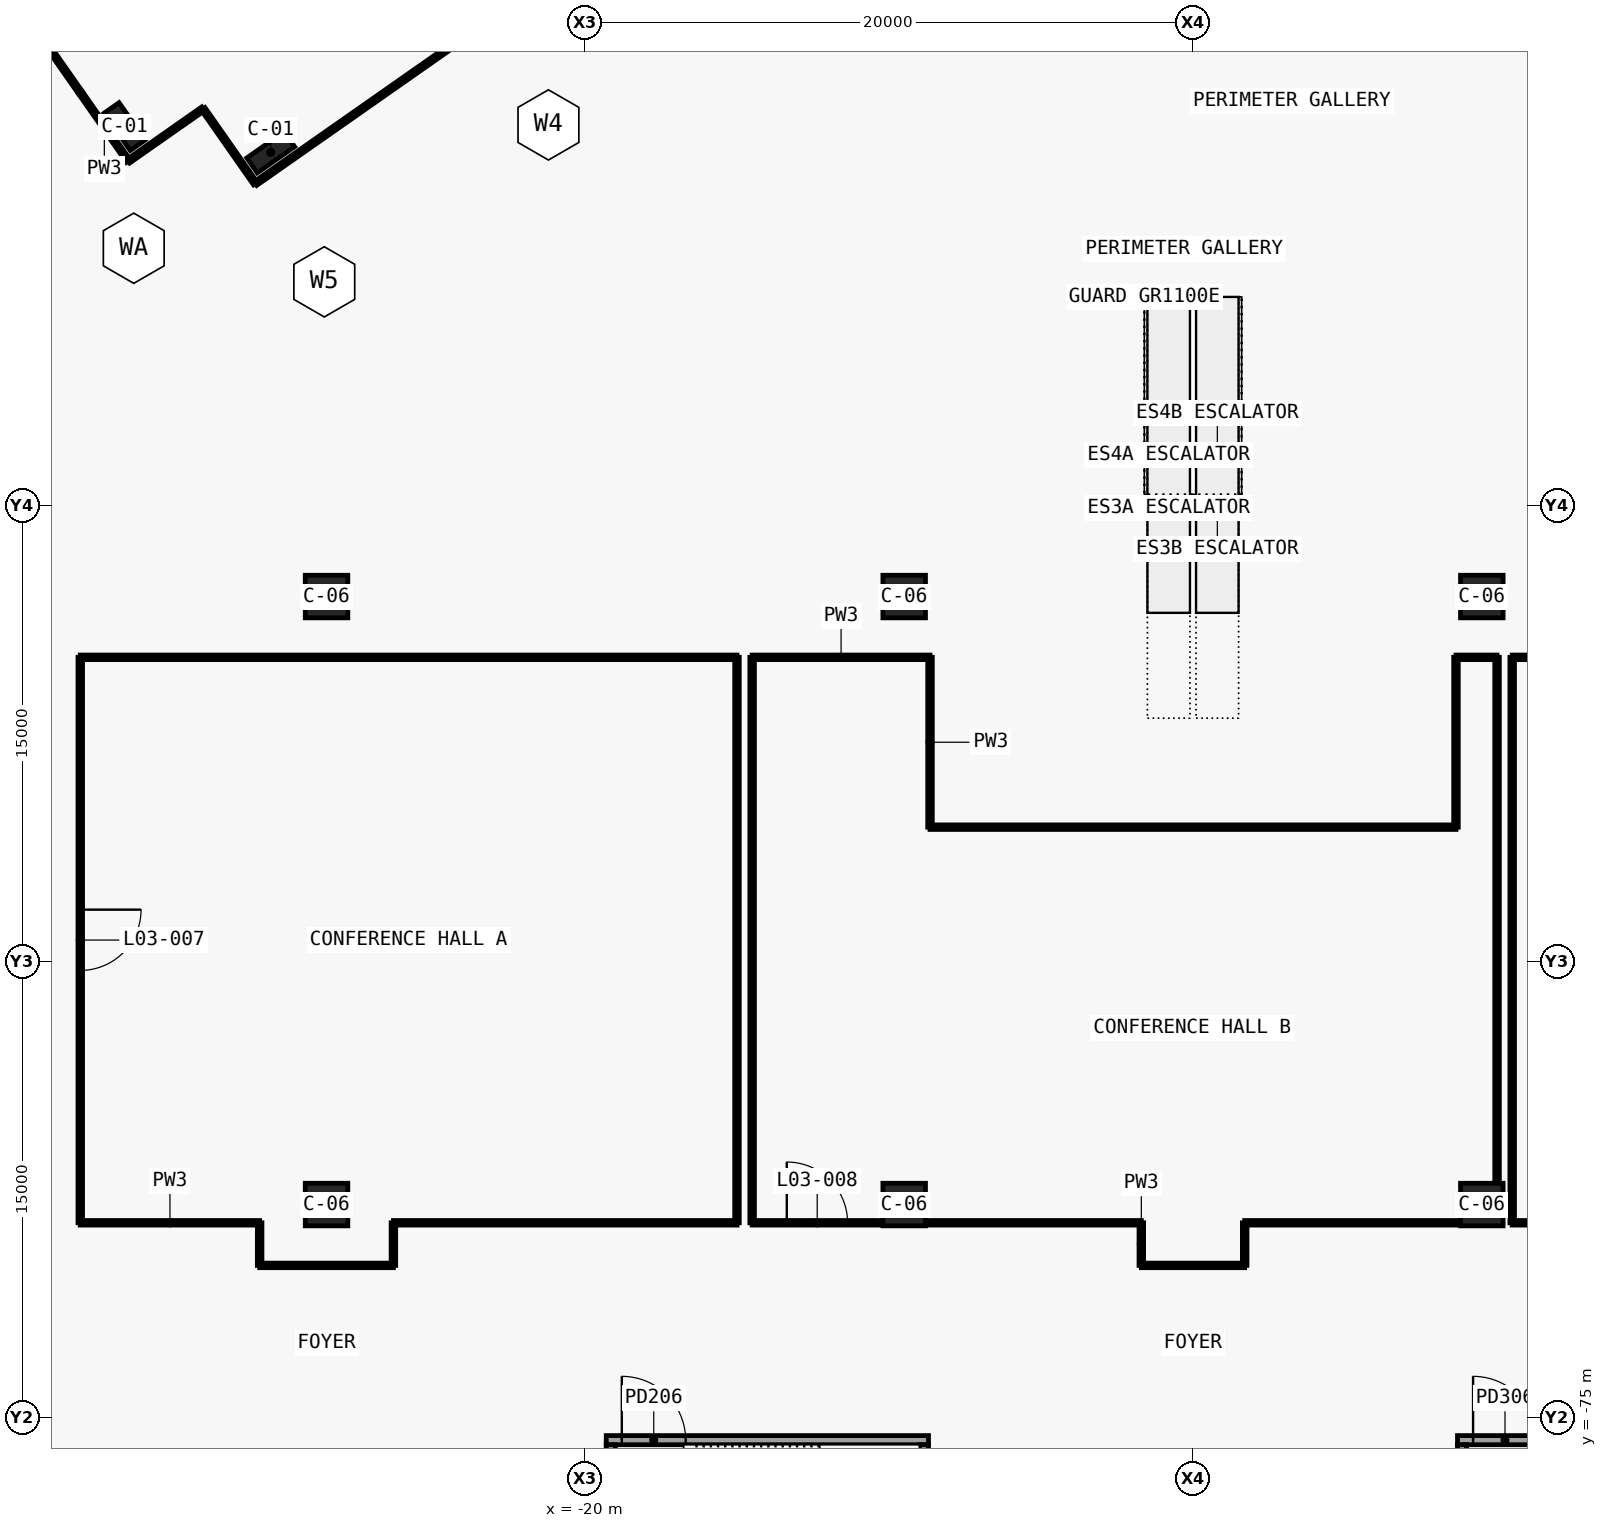
"""IFC4 building model, lengths in metres.
Left out: names, types, materials, properties, quantities, classifications, styles, units other than length and angle.
Written with IfcOpenShell. Run it as: python <this file> out.ifc"""

import sys

from ifc_helpers import new_model, si_unit, direction, frame, frame_2d, origin, origin_2d, place, context, subcontext, project, spatial, rectangle, extrude, element, fill, save


model = new_model("IFC4")
c1 = context("Model", 3, precision=1e-05, world=origin(), true_north=direction((0.0, 1.0)))
c2 = subcontext(c1, "Body", "Model", "MODEL_VIEW")
j1 = project(units=[si_unit("LENGTHUNIT", "METRE"), si_unit("PLANEANGLEUNIT", "RADIAN")], contexts=[c1])
p1 = place(None, origin())
s1 = spatial("IfcSite", under=j1, at=p1, CompositionType="ELEMENT")
p2 = place(p1, origin())
s2 = spatial("IfcBuilding", under=s1, at=p2, CompositionType="ELEMENT")
p3 = place(p2, frame((0.0, 0.0, 26.0)))
s3 = spatial("IfcBuildingStorey", under=s2, at=p3, CompositionType="ELEMENT", Elevation=26.0)
p4 = place(p3, frame((-19.3, -75.75, 0.0), z_axis=(0.0, 0.0, 1.0), x_axis=(1.0, 0.0, 0.0)))
e1 = element("IfcWall", 1, at=p4, inside=s3, PredefinedType="SOLIDWALL", context=c2, shape_type="SweptSolid", body=[
    extrude(rectangle(XDim=10.6, YDim=0.3, at=frame_2d((5.3, 0.0))), origin(), (0.0, 0.0, 1.0), 6.0),
])
p5 = place(p4, frame((0.512, 0.0, 0.0)))
e2 = element("IfcOpeningElement", 2, at=p5, cuts=e1, PredefinedType="OPENING", context=c2, shape_type="SweptSolid", body=[
    extrude(rectangle(XDim=2.1, YDim=2.1, at=frame_2d((1.05, 1.05))), frame((0.0, 0.16, 0.0), z_axis=(0.0, -1.0, 0.0), x_axis=(1.0, 0.0, 0.0)), (0.0, 0.0, 1.0), 0.32),
])
for number, where, z_axis, x_axis in (
    (3, (-19.15, -81.1, 0.0), (0.0, 0.0, 1.0), (0.0, 1.0, 0.0)),
    (4, (-8.85, -81.1, 0.0), (0.0, 0.0, 1.0), (0.0, 1.0, 0.0)),
):
    element("IfcWall", number, at=place(p3, frame(where, z_axis=z_axis, x_axis=x_axis)), inside=s3, PredefinedType="SOLIDWALL", context=c2, shape_type="SweptSolid", body=[
        extrude(rectangle(XDim=5.2, YDim=0.3, at=frame_2d((2.6, 0.0))), origin(), (0.0, 0.0, 1.0), 6.0),
    ])
p6 = place(p3, frame((8.7, -75.75, 0.0), z_axis=(0.0, 0.0, 1.0), x_axis=(1.0, 0.0, 0.0)))
e5 = element("IfcWall", 5, at=p6, inside=s3, PredefinedType="SOLIDWALL", context=c2, shape_type="SweptSolid", body=[
    extrude(rectangle(XDim=10.6, YDim=0.3, at=frame_2d((5.3, 0.0))), origin(), (0.0, 0.0, 1.0), 6.0),
])
p7 = place(p6, frame((0.512, 0.0, 0.0)))
e6 = element("IfcOpeningElement", 6, at=p7, cuts=e5, PredefinedType="OPENING", context=c2, shape_type="SweptSolid", body=[
    extrude(rectangle(XDim=2.1, YDim=2.1, at=frame_2d((1.05, 1.05))), frame((0.0, 0.16, 0.0), z_axis=(0.0, -1.0, 0.0), x_axis=(1.0, 0.0, 0.0)), (0.0, 0.0, 1.0), 0.32),
])
p8 = place(p3, frame((8.85, -81.1, 0.0), z_axis=(0.0, 0.0, 1.0), x_axis=(0.0, 1.0, 0.0)))
e7 = element("IfcWall", 7, at=p8, inside=s3, PredefinedType="SOLIDWALL", context=c2, shape_type="SweptSolid", body=[
    extrude(rectangle(XDim=5.2, YDim=0.3, at=frame_2d((2.6, 0.0))), origin(), (0.0, 0.0, 1.0), 6.0),
])
for number, where, z_axis, x_axis in (
    (8, (-30.336, -33.388, 0.0), (0.0, 0.0, 1.0), (-0.819, -0.574, 0.0)),
    (9, (-35.14, -32.541, 0.0), (0.0, 0.0, 1.0), (-0.574, 0.819, 0.0)),
):
    element("IfcColumn", number, at=place(p3, frame(where, z_axis=z_axis, x_axis=x_axis)), inside=s3, PredefinedType="COLUMN", context=c2, shape_type="SweptSolid", body=[
        extrude(rectangle(XDim=1.5, YDim=0.6, at=origin_2d()), origin(), (0.0, 0.0, 1.0), 6.0),
    ])
for number, where, z_axis, x_axis in (
    (10, (-28.5, -68.0, 0.0), (0.0, 0.0, 1.0), (1.0, 0.0, 0.0)),
    (11, (-9.5, -68.0, 0.0), (0.0, 0.0, 1.0), (1.0, 0.0, 0.0)),
    (12, (9.5, -68.0, 0.0), (0.0, 0.0, 1.0), (1.0, 0.0, 0.0)),
    (13, (-28.5, -48.0, 0.0), (0.0, 0.0, 1.0), (1.0, 0.0, 0.0)),
    (14, (-9.5, -48.0, 0.0), (0.0, 0.0, 1.0), (1.0, 0.0, 0.0)),
    (15, (9.5, -48.0, 0.0), (0.0, 0.0, 1.0), (1.0, 0.0, 0.0)),
):
    element("IfcColumn", number, at=place(p3, frame(where, z_axis=z_axis, x_axis=x_axis)), inside=s3, PredefinedType="COLUMN", context=c2, shape_type="SweptSolid", body=[
        extrude(rectangle(XDim=1.4, YDim=1.4, at=origin_2d()), origin(), (0.0, 0.0, 1.0), 6.0),
    ])
p9 = place(p3, frame((30.839, -34.412, 0.0), z_axis=(0.0, 0.0, 1.0), x_axis=(-0.819153188106, 0.573574802808, 0.0)))
e16 = element("IfcWall", 16, at=p9, inside=s3, PredefinedType="PARTITIONING", context=c2, shape_type="SweptSolid", body=[
    extrude(rectangle(XDim=25.351, YDim=0.15, at=frame_2d((12.675, 0.0))), origin(), (0.0, 0.0, 1.0), 5.6),
])
p10 = place(p3, frame((-14.999, -68.599, 0.0), z_axis=(0.0, 0.0, 1.0), x_axis=(0.0, 1.0, 0.0)))
e17 = element("IfcWall", 17, at=p10, inside=s3, PredefinedType="PARTITIONING", context=c2, shape_type="SweptSolid", body=[
    extrude(rectangle(XDim=18.599, YDim=0.15, at=frame_2d((9.3, 0.0))), origin(), (0.0, 0.0, 1.0), 4.78),
])
p11 = place(p3, frame((-15.0, -49.999, 0.0), z_axis=(0.0, 0.0, 1.0), x_axis=(-1.0, 0.0, 0.0)))
e18 = element("IfcWall", 18, at=p11, inside=s3, PredefinedType="PARTITIONING", context=c2, shape_type="SweptSolid", body=[
    extrude(rectangle(XDim=21.599, YDim=0.15, at=frame_2d((10.8, 0.0))), origin(), (0.0, 0.0, 1.0), 4.78),
])
p12 = place(p3, frame((10.001, -67.28, 0.0), z_axis=(0.0, 0.0, 1.0), x_axis=(0.0, 1.0, 0.0)))
e19 = element("IfcWall", 19, at=p12, inside=s3, PredefinedType="PARTITIONING", context=c2, shape_type="SweptSolid", body=[
    extrude(rectangle(XDim=17.28, YDim=0.15, at=frame_2d((8.64, 0.0))), origin(), (0.0, 0.0, 1.0), 5.13),
])
p13 = place(p3, frame((10.0, -49.999, 0.0), z_axis=(0.0, 0.0, 1.0), x_axis=(-1.0, 0.0, 0.0)))
e20 = element("IfcWall", 20, at=p13, inside=s3, PredefinedType="PARTITIONING", context=c2, shape_type="SweptSolid", body=[
    extrude(rectangle(XDim=1.349, YDim=0.15, at=frame_2d((0.675, 0.0))), origin(), (0.0, 0.0, 1.0), 4.78),
])
p14 = place(p3, frame((-8.651, -49.999, 0.0), z_axis=(0.0, 0.0, 1.0), x_axis=(-1.0, 0.0, 0.0)))
e21 = element("IfcWall", 21, at=p14, inside=s3, PredefinedType="PARTITIONING", context=c2, shape_type="SweptSolid", body=[
    extrude(rectangle(XDim=5.849, YDim=0.15, at=frame_2d((2.925, 0.0))), origin(), (0.0, 0.0, 1.0), 4.78),
])
p15 = place(p3, frame((-14.501, -50.0, 0.0), z_axis=(0.0, 0.0, 1.0), x_axis=(0.0, -1.0, 0.0)))
e22 = element("IfcWall", 22, at=p15, inside=s3, PredefinedType="PARTITIONING", context=c2, shape_type="SweptSolid", body=[
    extrude(rectangle(XDim=18.599, YDim=0.15, at=frame_2d((9.3, 0.0))), origin(), (0.0, 0.0, 1.0), 4.78),
])
p16 = place(p3, frame((30.0, -49.999, 0.0), z_axis=(0.0, 0.0, 1.0), x_axis=(-1.0, 0.0, 0.0)))
e23 = element("IfcWall", 23, at=p16, inside=s3, PredefinedType="PARTITIONING", context=c2, shape_type="SweptSolid", body=[
    extrude(rectangle(XDim=19.5, YDim=0.15, at=frame_2d((9.75, 0.0))), origin(), (0.0, 0.0, 1.0), 4.78),
])
p17 = place(p3, frame((10.499, -50.0, 0.0), z_axis=(0.0, 0.0, 1.0), x_axis=(0.0, -1.0, 0.0)))
e24 = element("IfcWall", 24, at=p17, inside=s3, PredefinedType="PARTITIONING", context=c2, shape_type="SweptSolid", body=[
    extrude(rectangle(XDim=18.599, YDim=0.15, at=frame_2d((9.3, 0.0))), origin(), (0.0, 0.0, 1.0), 4.78),
])
p18 = place(p3, frame((-35.017, -33.676, 0.0), z_axis=(0.0, 0.0, 1.0), x_axis=(0.81917072002, 0.573549763719, 0.0)))
e25 = element("IfcWall", 25, at=p18, inside=s3, PredefinedType="PARTITIONING", context=c2, shape_type="SweptSolid", body=[
    extrude(rectangle(XDim=2.999, YDim=0.15, at=frame_2d((1.5, 0.0))), origin(), (0.0, 0.0, 1.0), 4.38),
])
p19 = place(p3, frame((-32.56, -31.956, 0.0), z_axis=(0.0, 0.0, 1.0), x_axis=(0.573604390867, -0.819132469615, 0.0)))
e26 = element("IfcWall", 26, at=p19, inside=s3, PredefinedType="PARTITIONING", context=c2, shape_type="SweptSolid", body=[
    extrude(rectangle(XDim=2.999, YDim=0.15, at=frame_2d((1.5, 0.0))), origin(), (0.0, 0.0, 1.0), 4.38),
])
p20 = place(p3, frame((-30.839, -34.413, 0.0), z_axis=(0.0, 0.0, 1.0), x_axis=(0.819150779762, 0.573578242279, 0.0)))
e27 = element("IfcWall", 27, at=p20, inside=s3, PredefinedType="PARTITIONING", context=c2, shape_type="SweptSolid", body=[
    extrude(rectangle(XDim=27.002, YDim=0.15, at=frame_2d((13.501, 0.0))), origin(), (0.0, 0.0, 1.0), 4.58),
])
p21 = place(p3, frame((-36.599, -31.418, 0.0), z_axis=(0.0, 0.0, 1.0), x_axis=(0.57362881286, -0.819115367367, 0.0)))
e28 = element("IfcWall", 28, at=p21, inside=s3, PredefinedType="PARTITIONING", context=c2, shape_type="SweptSolid", body=[
    extrude(rectangle(XDim=2.756, YDim=0.15, at=frame_2d((1.378, 0.0))), origin(), (0.0, 0.0, 1.0), 5.6),
])
p22 = place(p3, frame((-1.699, -70.001, 0.0), z_axis=(0.0, 0.0, 1.0), x_axis=(1.0, 0.0, 0.0)))
e29 = element("IfcWall", 29, at=p22, inside=s3, PredefinedType="PARTITIONING", context=c2, shape_type="SweptSolid", body=[
    extrude(rectangle(XDim=3.398, YDim=0.15, at=frame_2d((1.699, 0.0))), origin(), (0.0, 0.0, 1.0), 5.6),
])
p23 = place(p3, frame((-30.699, -70.001, 0.0), z_axis=(0.0, 0.0, 1.0), x_axis=(1.0, 0.0, 0.0)))
e30 = element("IfcWall", 30, at=p23, inside=s3, PredefinedType="PARTITIONING", context=c2, shape_type="SweptSolid", body=[
    extrude(rectangle(XDim=4.398, YDim=0.15, at=frame_2d((2.199, 0.0))), origin(), (0.0, 0.0, 1.0), 4.78),
])
p24 = place(p3, frame((-36.6, -49.998, 0.0), z_axis=(0.0, 0.0, 1.0), x_axis=(0.0, -1.0, 0.0)))
e31 = element("IfcWall", 31, at=p24, inside=s3, PredefinedType="PARTITIONING", context=c2, shape_type="SweptSolid", body=[
    extrude(rectangle(XDim=18.602, YDim=0.15, at=frame_2d((9.301, 0.0))), origin(), (0.0, 0.0, 1.0), 4.78),
])
p25 = place(p24, frame((8.301, 0.0, 0.0)))
e32 = element("IfcOpeningElement", 32, at=p25, cuts=e31, PredefinedType="OPENING", context=c2, shape_type="SweptSolid", body=[
    extrude(rectangle(XDim=2.0, YDim=2.4, at=frame_2d((1.0, 1.2))), frame((0.0, 0.085, 0.0), z_axis=(0.0, -1.0, 0.0), x_axis=(1.0, 0.0, 0.0)), (0.0, 0.0, 1.0), 0.17),
])
p26 = place(p3, frame((-36.6, -68.6, 0.0), z_axis=(0.0, 0.0, 1.0), x_axis=(1.0, 0.0, 0.0)))
e33 = element("IfcWall", 33, at=p26, inside=s3, PredefinedType="PARTITIONING", context=c2, shape_type="SweptSolid", body=[
    extrude(rectangle(XDim=5.9, YDim=0.15, at=frame_2d((2.95, 0.0))), origin(), (0.0, 0.0, 1.0), 5.6),
])
for number, where, z_axis, x_axis in (
    (34, (-30.7, -68.6, 0.0), (0.0, 0.0, 1.0), (0.0, -1.0, 0.0)),
    (35, (-26.3, -70.002, 0.0), (0.0, 0.0, 1.0), (0.0, 1.0, 0.0)),
):
    element("IfcWall", number, at=place(p3, frame(where, z_axis=z_axis, x_axis=x_axis)), inside=s3, PredefinedType="PARTITIONING", context=c2, shape_type="SweptSolid", body=[
        extrude(rectangle(XDim=1.402, YDim=0.15, at=frame_2d((0.701, 0.0))), origin(), (0.0, 0.0, 1.0), 5.6),
    ])
p27 = place(p3, frame((-26.3, -68.6, 0.0), z_axis=(0.0, 0.0, 1.0), x_axis=(1.0, 0.0, 0.0)))
e36 = element("IfcWall", 36, at=p27, inside=s3, PredefinedType="PARTITIONING", context=c2, shape_type="SweptSolid", body=[
    extrude(rectangle(XDim=11.302, YDim=0.15, at=frame_2d((5.651, 0.0))), origin(), (0.0, 0.0, 1.0), 5.6),
])
p28 = place(p3, frame((-14.502, -68.6, 0.0), z_axis=(0.0, 0.0, 1.0), x_axis=(1.0, 0.0, 0.0)))
e37 = element("IfcWall", 37, at=p28, inside=s3, PredefinedType="PARTITIONING", context=c2, shape_type="SweptSolid", body=[
    extrude(rectangle(XDim=4.282, YDim=0.15, at=frame_2d((2.141, 0.0))), origin(), (0.0, 0.0, 1.0), 5.6),
])
p29 = place(p28, frame((1.141, 0.0, 0.0)))
e38 = element("IfcOpeningElement", 38, at=p29, cuts=e37, PredefinedType="OPENING", context=c2, shape_type="SweptSolid", body=[
    extrude(rectangle(XDim=2.0, YDim=2.4, at=frame_2d((1.0, 1.2))), frame((0.0, 0.085, 0.0), z_axis=(0.0, -1.0, 0.0), x_axis=(1.0, 0.0, 0.0)), (0.0, 0.0, 1.0), 0.17),
])
p30 = place(p3, frame((-8.78, -68.6, 0.0), z_axis=(0.0, 0.0, 1.0), x_axis=(1.0, 0.0, 0.0)))
e39 = element("IfcWall", 39, at=p30, inside=s3, PredefinedType="PARTITIONING", context=c2, shape_type="SweptSolid", body=[
    extrude(rectangle(XDim=7.08, YDim=0.15, at=frame_2d((3.54, 0.0))), origin(), (0.0, 0.0, 1.0), 5.6),
])
for number, where, z_axis, x_axis in (
    (40, (-1.7, -68.6, 0.0), (0.0, 0.0, 1.0), (0.0, -1.0, 0.0)),
    (41, (1.7, -70.002, 0.0), (0.0, 0.0, 1.0), (0.0, 1.0, 0.0)),
):
    element("IfcWall", number, at=place(p3, frame(where, z_axis=z_axis, x_axis=x_axis)), inside=s3, PredefinedType="PARTITIONING", context=c2, shape_type="SweptSolid", body=[
        extrude(rectangle(XDim=1.402, YDim=0.15, at=frame_2d((0.701, 0.0))), origin(), (0.0, 0.0, 1.0), 5.6),
    ])
p31 = place(p3, frame((1.7, -68.6, 0.0), z_axis=(0.0, 0.0, 1.0), x_axis=(1.0, 0.0, 0.0)))
e42 = element("IfcWall", 42, at=p31, inside=s3, PredefinedType="PARTITIONING", context=c2, shape_type="SweptSolid", body=[
    extrude(rectangle(XDim=7.08, YDim=0.15, at=frame_2d((3.54, 0.0))), origin(), (0.0, 0.0, 1.0), 5.6),
])
p32 = place(p3, frame((10.498, -68.6, 0.0), z_axis=(0.0, 0.0, 1.0), x_axis=(1.0, 0.0, 0.0)))
e43 = element("IfcWall", 43, at=p32, inside=s3, PredefinedType="PARTITIONING", context=c2, shape_type="SweptSolid", body=[
    extrude(rectangle(XDim=15.802, YDim=0.15, at=frame_2d((7.901, 0.0))), origin(), (0.0, 0.0, 1.0), 5.6),
])
p33 = place(p3, frame((-37.6, -29.988, 0.0), z_axis=(0.0, 0.0, 1.0), x_axis=(0.573518712821, -0.819192459709, 0.0)))
e44 = element("IfcWall", 44, at=p33, inside=s3, PredefinedType="PARTITIONING", context=c2, shape_type="SweptSolid", body=[
    extrude(rectangle(XDim=1.744, YDim=0.15, at=frame_2d((0.872, 0.0))), origin(), (0.0, 0.0, 1.0), 5.6),
])
p34 = place(p3, frame((8.65, -55.586, 0.0), z_axis=(0.0, 0.0, 1.0), x_axis=(-1.0, 0.0, 0.0)))
e45 = element("IfcWall", 45, at=p34, inside=s3, PredefinedType="PARTITIONING", context=c2, shape_type="SweptSolid", body=[
    extrude(rectangle(XDim=17.3, YDim=0.15, at=frame_2d((8.65, 0.0))), origin(), (0.0, 0.0, 1.0), 5.6),
])
for number, where, z_axis, x_axis in (
    (46, (-8.65, -55.586, 0.0), (0.0, 0.0, 1.0), (0.0, 1.0, 0.0)),
    (47, (8.65, -49.998, 0.0), (0.0, 0.0, 1.0), (0.0, -1.0, 0.0)),
):
    element("IfcWall", number, at=place(p3, frame(where, z_axis=z_axis, x_axis=x_axis)), inside=s3, PredefinedType="PARTITIONING", context=c2, shape_type="SweptSolid", body=[
        extrude(rectangle(XDim=5.588, YDim=0.15, at=frame_2d((2.794, 0.0))), origin(), (0.0, 0.0, 1.0), 5.13),
    ])
p35 = place(p5, origin())
e48 = element("IfcDoor", 48, at=p35, inside=s3, OperationType="DOUBLE_DOOR_SINGLE_SWING", PredefinedType="DOOR", context=c2, shape_type="SweptSolid", body=[
    extrude(rectangle(XDim=2.1, YDim=2.1, at=frame_2d((1.05, 1.05))), frame((0.0, 0.025, 0.0), z_axis=(0.0, -1.0, 0.0), x_axis=(1.0, 0.0, 0.0)), (0.0, 0.0, 1.0), 0.05),
])
fill(e2, e48)
p36 = place(p7, origin())
e49 = element("IfcDoor", 49, at=p36, inside=s3, OperationType="DOUBLE_DOOR_SINGLE_SWING", PredefinedType="DOOR", context=c2, shape_type="SweptSolid", body=[
    extrude(rectangle(XDim=2.1, YDim=2.1, at=frame_2d((1.05, 1.05))), frame((0.0, 0.025, 0.0), z_axis=(0.0, -1.0, 0.0), x_axis=(1.0, 0.0, 0.0)), (0.0, 0.0, 1.0), 0.05),
])
fill(e6, e49)
p37 = place(p25, origin())
e50 = element("IfcDoor", 50, at=p37, inside=s3, OperationType="DOUBLE_DOOR_SINGLE_SWING", PredefinedType="DOOR", context=c2, shape_type="SweptSolid", body=[
    extrude(rectangle(XDim=2.0, YDim=2.4, at=frame_2d((1.0, 1.2))), frame((0.0, 0.025, 0.0), z_axis=(0.0, -1.0, 0.0), x_axis=(1.0, 0.0, 0.0)), (0.0, 0.0, 1.0), 0.05),
])
fill(e32, e50)
p38 = place(p29, origin())
e51 = element("IfcDoor", 51, at=p38, inside=s3, OperationType="DOUBLE_DOOR_SINGLE_SWING", PredefinedType="DOOR", context=c2, shape_type="SweptSolid", body=[
    extrude(rectangle(XDim=2.0, YDim=2.4, at=frame_2d((1.0, 1.2))), frame((0.0, 0.025, 0.0), z_axis=(0.0, -1.0, 0.0), x_axis=(1.0, 0.0, 0.0)), (0.0, 0.0, 1.0), 0.05),
])
fill(e38, e51)
save(model, sys.argv[1])
